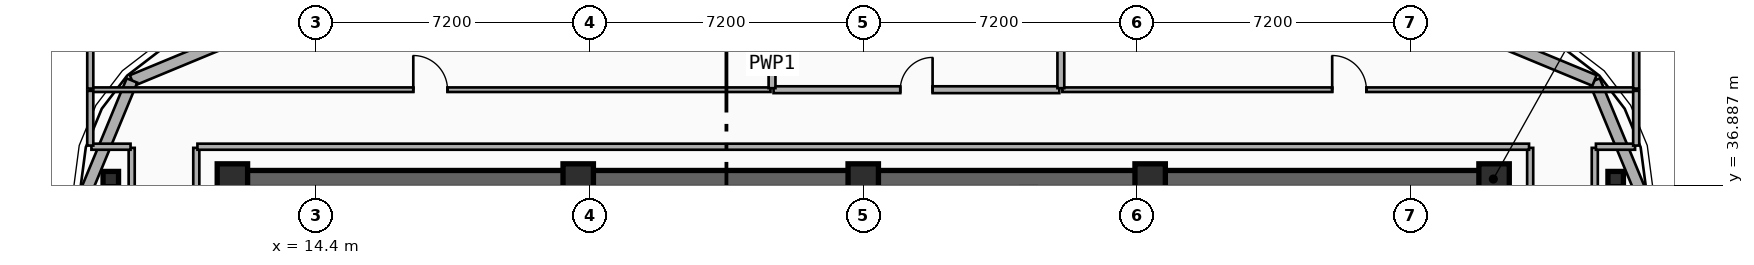
"""IFC4 building model, lengths in metres.
Left out: names, types, materials, properties, quantities, classifications, styles, units other than length and angle.
Written with IfcOpenShell. Run it as: python <this file> out.ifc"""

import sys

from ifc_helpers import new_model, si_unit, direction, frame, frame_2d, origin, origin_2d, place, context, subcontext, project, spatial, rectangle, i_section, extrude, element, fill, save


model = new_model("IFC4")
c1 = context("Model", 3, precision=1e-05, world=origin(), true_north=direction((0.0, 1.0)))
c2 = subcontext(c1, "Body", "Model", "MODEL_VIEW")
j1 = project(units=[si_unit("LENGTHUNIT", "METRE"), si_unit("PLANEANGLEUNIT", "RADIAN")], contexts=[c1])
p1 = place(None, origin())
s1 = spatial("IfcSite", under=j1, at=p1, CompositionType="ELEMENT")
p2 = place(p1, origin())
s2 = spatial("IfcBuilding", under=s1, at=p2, CompositionType="ELEMENT")
p3 = place(p2, frame((0.0, 0.0, 273.2)))
s3 = spatial("IfcBuildingStorey", under=s2, at=p3, CompositionType="ELEMENT", Elevation=273.2)
p4 = place(p3, frame((12.15, 37.05, 0.0), z_axis=(0.0, 0.0, 1.0), x_axis=(1.0, 0.0, 0.0)))
e1 = element("IfcWall", 1, at=p4, inside=s3, PredefinedType="SHEAR", context=c2, shape_type="SweptSolid", body=[
    extrude(rectangle(XDim=33.23, YDim=0.45, at=frame_2d((16.615, 0.0))), origin(), (0.0, 0.0, 1.0), 3.7),
])
for number, where, z_axis, x_axis in (
    (2, (12.2, 37.05, 0.0), (0.0, 0.0, 1.0), (1.0, 0.0, 0.0)),
    (3, (21.3, 37.05, 0.0), (0.0, 0.0, 1.0), (1.0, 0.0, 0.0)),
    (4, (28.8, 37.05, 0.0), (0.0, 0.0, 1.0), (1.0, 0.0, 0.0)),
    (5, (36.35, 37.05, 0.0), (0.0, 0.0, 1.0), (1.0, 0.0, 0.0)),
    (6, (45.4, 37.05, 0.0), (0.0, 0.0, 1.0), (1.0, 0.0, 0.0)),
):
    element("IfcColumn", number, at=place(p3, frame(where, z_axis=z_axis, x_axis=x_axis)), inside=s3, PredefinedType="COLUMN", context=c2, shape_type="SweptSolid", body=[
        extrude(rectangle(XDim=0.8, YDim=0.8, at=origin_2d()), origin(), (0.0, 0.0, 1.0), 3.7),
    ])
for number, where, z_axis, x_axis in (
    (7, (9.0, 37.05, 0.0), (0.0, 0.0, 1.0), (1.0, 0.0, 0.0)),
    (8, (48.6, 37.05, 0.0), (0.0, 0.0, 1.0), (1.0, 0.0, 0.0)),
):
    element("IfcColumn", number, at=place(p3, frame(where, z_axis=z_axis, x_axis=x_axis)), inside=s3, PredefinedType="COLUMN", context=c2, shape_type="SweptSolid", body=[
        extrude(i_section(OverallWidth=0.408, OverallDepth=0.4, WebThickness=0.025, FlangeThickness=0.039, FilletRadius=0.015, at=origin_2d()), origin(), (0.0, 0.0, 1.0), 3.7),
    ])
for number, where, z_axis, x_axis in (
    (9, (48.042, 39.643, 0.0), (0.0, 0.0, 1.0), (0.383, -0.924, 0.0)),
    (10, (45.2, 40.82, 0.0), (0.0, 0.0, 1.0), (0.924, -0.383, 0.0)),
    (11, (9.557, 39.643, 0.0), (0.0, 0.0, 1.0), (0.924, 0.383, 0.0)),
    (12, (8.38, 36.8, 0.0), (0.0, 0.0, 1.0), (0.383, 0.924, 0.0)),
):
    element("IfcWall", number, at=place(p3, frame(where, z_axis=z_axis, x_axis=x_axis)), inside=s3, PredefinedType="SOLIDWALL", context=c2, shape_type="SweptSolid", body=[
        extrude(rectangle(XDim=3.077, YDim=0.3, at=frame_2d((1.538, 0.0))), origin(), (0.0, 0.0, 1.0), 3.42),
    ])
p5 = place(p3, frame((8.46, 39.4, 0.0), z_axis=(0.0, 0.0, 1.0), x_axis=(1.0, 0.0, 0.0)))
e13 = element("IfcWall", 13, at=p5, inside=s3, PredefinedType="PARTITIONING", context=c2, shape_type="SweptSolid", body=[
    extrude(rectangle(XDim=17.9, YDim=0.12, at=frame_2d((8.95, 0.0))), origin(), (0.0, 0.0, 1.0), 3.42),
])
p6 = place(p5, frame((8.5, 0.0, 0.0)))
e14 = element("IfcOpeningElement", 14, at=p6, cuts=e13, PredefinedType="OPENING", context=c2, shape_type="SweptSolid", body=[
    extrude(rectangle(XDim=0.9, YDim=2.1, at=frame_2d((0.45, 1.05))), frame((0.0, 0.07, 0.0), z_axis=(0.0, -1.0, 0.0), x_axis=(1.0, 0.0, 0.0)), (0.0, 0.0, 1.0), 0.14),
])
p7 = place(p3, frame((26.44, 39.4, 0.0), z_axis=(0.0, 0.0, 1.0), x_axis=(1.0, 0.0, 0.0)))
e15 = element("IfcWall", 15, at=p7, inside=s3, PredefinedType="PLUMBINGWALL", context=c2, shape_type="SweptSolid", body=[
    extrude(rectangle(XDim=7.52, YDim=0.18, at=frame_2d((3.76, 0.0))), origin(), (0.0, 0.0, 1.0), 3.42),
])
p8 = place(p7, frame((3.335, 0.0, 0.0)))
e16 = element("IfcOpeningElement", 16, at=p8, cuts=e15, PredefinedType="OPENING", context=c2, shape_type="SweptSolid", body=[
    extrude(rectangle(XDim=0.85, YDim=2.1, at=frame_2d((0.425, 1.05))), frame((0.0, 0.1, 0.0), z_axis=(0.0, -1.0, 0.0), x_axis=(1.0, 0.0, 0.0)), (0.0, 0.0, 1.0), 0.2),
])
p9 = place(p3, frame((34.04, 39.4, 0.0), z_axis=(0.0, 0.0, 1.0), x_axis=(1.0, 0.0, 0.0)))
e17 = element("IfcWall", 17, at=p9, inside=s3, PredefinedType="PARTITIONING", context=c2, shape_type="SweptSolid", body=[
    extrude(rectangle(XDim=15.1, YDim=0.12, at=frame_2d((7.55, 0.0))), origin(), (0.0, 0.0, 1.0), 3.42),
])
p10 = place(p9, frame((7.1, 0.0, 0.0)))
e18 = element("IfcOpeningElement", 18, at=p10, cuts=e17, PredefinedType="OPENING", context=c2, shape_type="SweptSolid", body=[
    extrude(rectangle(XDim=0.9, YDim=2.1, at=frame_2d((0.45, 1.05))), frame((0.0, 0.07, 0.0), z_axis=(0.0, -1.0, 0.0), x_axis=(1.0, 0.0, 0.0)), (0.0, 0.0, 1.0), 0.14),
])
for number, where, z_axis, x_axis in (
    (19, (26.4, 39.44, 0.0), (0.0, 0.0, 1.0), (0.0, 1.0, 0.0)),
    (20, (34.0, 39.44, 0.0), (0.0, 0.0, 1.0), (0.0, 1.0, 0.0)),
):
    element("IfcWall", number, at=place(p3, frame(where, z_axis=z_axis, x_axis=x_axis)), inside=s3, PredefinedType="PLUMBINGWALL", context=c2, shape_type="SweptSolid", body=[
        extrude(rectangle(XDim=1.3, YDim=0.18, at=frame_2d((0.65, 0.0))), origin(), (0.0, 0.0, 1.0), 3.42),
    ])
for number, where, z_axis, x_axis in (
    (21, (9.55, 27.63, 0.0), (0.0, 0.0, 1.0), (0.0, 1.0, 0.0)),
    (22, (11.25, 27.63, 0.0), (0.0, 0.0, 1.0), (0.0, 1.0, 0.0)),
    (23, (46.35, 27.63, 0.0), (0.0, 0.0, 1.0), (0.0, 1.0, 0.0)),
    (24, (48.05, 27.63, 0.0), (0.0, 0.0, 1.0), (0.0, 1.0, 0.0)),
):
    element("IfcWall", number, at=place(p3, frame(where, z_axis=z_axis, x_axis=x_axis)), inside=s3, PredefinedType="PARTITIONING", context=c2, shape_type="SweptSolid", body=[
        extrude(rectangle(XDim=10.24, YDim=0.16, at=frame_2d((5.12, 0.0))), origin(), (0.0, 0.0, 1.0), 2.9),
    ])
p11 = place(p3, frame((8.49, 37.9, 0.0), z_axis=(0.0, 0.0, 1.0), x_axis=(1.0, 0.0, 0.0)))
e25 = element("IfcWall", 25, at=p11, inside=s3, PredefinedType="PARTITIONING", context=c2, shape_type="SweptSolid", body=[
    extrude(rectangle(XDim=1.03, YDim=0.16, at=frame_2d((0.515, 0.0))), origin(), (0.0, 0.0, 1.0), 3.42),
])
p12 = place(p3, frame((11.28, 37.9, 0.0), z_axis=(0.0, 0.0, 1.0), x_axis=(1.0, 0.0, 0.0)))
e26 = element("IfcWall", 26, at=p12, inside=s3, PredefinedType="PARTITIONING", context=c2, shape_type="SweptSolid", body=[
    extrude(rectangle(XDim=35.04, YDim=0.16, at=frame_2d((17.52, 0.0))), origin(), (0.0, 0.0, 1.0), 3.42),
])
p13 = place(p3, frame((48.08, 37.9, 0.0), z_axis=(0.0, 0.0, 1.0), x_axis=(1.0, 0.0, 0.0)))
e27 = element("IfcWall", 27, at=p13, inside=s3, PredefinedType="PARTITIONING", context=c2, shape_type="SweptSolid", body=[
    extrude(rectangle(XDim=1.03, YDim=0.16, at=frame_2d((0.515, 0.0))), origin(), (0.0, 0.0, 1.0), 3.42),
])
for number, where, z_axis, x_axis in (
    (28, (8.46, 37.93, 0.0), (0.0, 0.0, 1.0), (0.0, 1.0, 0.0)),
    (29, (49.14, 37.93, 0.0), (0.0, 0.0, 1.0), (0.0, 1.0, 0.0)),
):
    element("IfcWall", number, at=place(p3, frame(where, z_axis=z_axis, x_axis=x_axis)), inside=s3, PredefinedType="PARTITIONING", context=c2, shape_type="SweptSolid", body=[
        extrude(rectangle(XDim=1.44, YDim=0.16, at=frame_2d((0.72, 0.0))), origin(), (0.0, 0.0, 1.0), 3.42),
    ])
for number, where, z_axis, x_axis in (
    (30, (8.46, 39.43, 0.0), (0.0, 0.0, 1.0), (0.0, 1.0, 0.0)),
    (31, (49.14, 39.43, 0.0), (0.0, 0.0, 1.0), (0.0, 1.0, 0.0)),
):
    element("IfcWall", number, at=place(p3, frame(where, z_axis=z_axis, x_axis=x_axis)), inside=s3, PredefinedType="PARTITIONING", context=c2, shape_type="SweptSolid", body=[
        extrude(rectangle(XDim=1.28, YDim=0.16, at=frame_2d((0.64, 0.0))), origin(), (0.0, 0.0, 1.0), 3.42),
    ])
p14 = place(p6, origin())
e32 = element("IfcDoor", 32, at=p14, inside=s3, OperationType="SINGLE_SWING_LEFT", PredefinedType="DOOR", context=c2, shape_type="SweptSolid", body=[
    extrude(rectangle(XDim=0.9, YDim=2.1, at=frame_2d((0.45, 1.05))), frame((0.0, 0.025, 0.0), z_axis=(0.0, -1.0, 0.0), x_axis=(1.0, 0.0, 0.0)), (0.0, 0.0, 1.0), 0.05),
])
fill(e14, e32)
p15 = place(p8, origin())
e33 = element("IfcDoor", 33, at=p15, inside=s3, OperationType="SINGLE_SWING_RIGHT", PredefinedType="DOOR", context=c2, shape_type="SweptSolid", body=[
    extrude(rectangle(XDim=0.85, YDim=2.1, at=frame_2d((0.425, 1.05))), frame((0.0, 0.025, 0.0), z_axis=(0.0, -1.0, 0.0), x_axis=(1.0, 0.0, 0.0)), (0.0, 0.0, 1.0), 0.05),
])
fill(e16, e33)
p16 = place(p10, origin())
e34 = element("IfcDoor", 34, at=p16, inside=s3, OperationType="SINGLE_SWING_LEFT", PredefinedType="DOOR", context=c2, shape_type="SweptSolid", body=[
    extrude(rectangle(XDim=0.9, YDim=2.1, at=frame_2d((0.45, 1.05))), frame((0.0, 0.025, 0.0), z_axis=(0.0, -1.0, 0.0), x_axis=(1.0, 0.0, 0.0)), (0.0, 0.0, 1.0), 0.05),
])
fill(e18, e34)
save(model, sys.argv[1])
